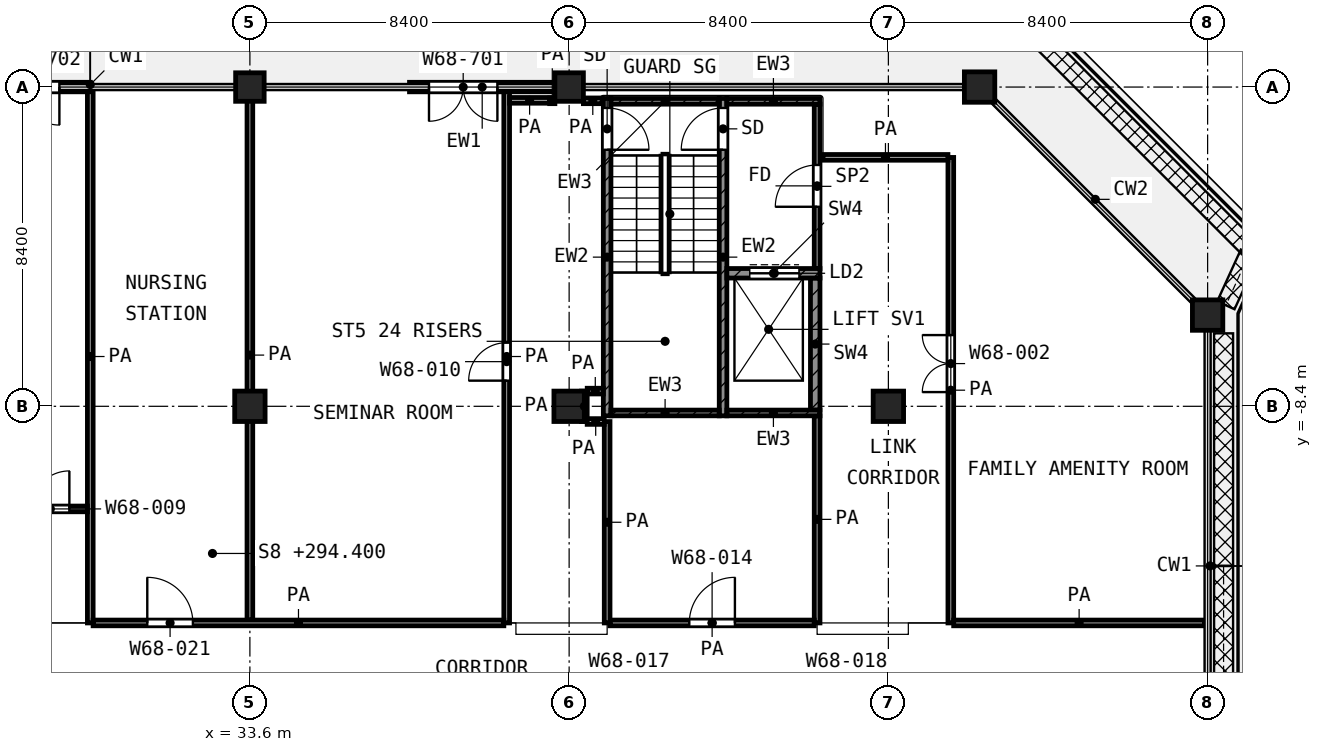
"""IFC4 building model, lengths in metres.
Left out: names, types, materials, properties, quantities, classifications, styles, units other than length and angle.
Written with IfcOpenShell. Run it as: python <this file> out.ifc"""

import sys

from ifc_helpers import new_model, si_unit, direction, frame, frame_2d, origin, origin_2d, place, context, subcontext, project, spatial, rectangle, extrude, element, fill, save


model = new_model("IFC4")
c1 = context("Model", 3, precision=1e-05, world=origin(), true_north=direction((0.0, 1.0)))
c2 = subcontext(c1, "Body", "Model", "MODEL_VIEW")
j1 = project(units=[si_unit("LENGTHUNIT", "METRE"), si_unit("PLANEANGLEUNIT", "RADIAN")], contexts=[c1])
p1 = place(None, origin())
s1 = spatial("IfcSite", under=j1, at=p1, CompositionType="ELEMENT")
p2 = place(p1, origin())
s2 = spatial("IfcBuilding", under=s1, at=p2, CompositionType="ELEMENT")
p3 = place(p2, frame((0.0, 0.0, 294.4)))
s3 = spatial("IfcBuildingStorey", under=s2, at=p3, CompositionType="ELEMENT", Elevation=294.4)
for number, where, z_axis, x_axis in (
    (1, (33.6, 0.0, 0.0), (0.0, 0.0, 1.0), (1.0, 0.0, 0.0)),
    (2, (42.0, 0.0, 0.0), (0.0, 0.0, 1.0), (1.0, 0.0, 0.0)),
):
    element("IfcColumn", number, at=place(p3, frame(where, z_axis=z_axis, x_axis=x_axis)), inside=s3, PredefinedType="COLUMN", context=c2, shape_type="SweptSolid", body=[
        extrude(rectangle(XDim=0.75, YDim=0.75, at=origin_2d()), origin(), (0.0, 0.0, 1.0), 4.2),
    ])
for number, where, z_axis, x_axis in (
    (3, (52.8, 0.0, 0.0), (0.0, 0.0, 1.0), (1.0, 0.0, 0.0)),
    (4, (58.8, -6.0, 0.0), (0.0, 0.0, 1.0), (1.0, 0.0, 0.0)),
    (5, (33.6, -8.4, 0.0), (0.0, 0.0, 1.0), (1.0, 0.0, 0.0)),
    (6, (42.0, -8.4, 0.0), (0.0, 0.0, 1.0), (1.0, 0.0, 0.0)),
    (7, (50.4, -8.4, 0.0), (0.0, 0.0, 1.0), (1.0, 0.0, 0.0)),
):
    element("IfcColumn", number, at=place(p3, frame(where, z_axis=z_axis, x_axis=x_axis)), inside=s3, PredefinedType="COLUMN", context=c2, shape_type="SweptSolid", body=[
        extrude(rectangle(XDim=0.8, YDim=0.8, at=origin_2d()), origin(), (0.0, 0.0, 1.0), 4.2),
    ])
p4 = place(p3, frame((41.625, 0.0, 0.0), z_axis=(0.0, 0.0, 1.0), x_axis=(-1.0, 0.0, 0.0)))
e8 = element("IfcWall", 8, at=p4, inside=s3, PredefinedType="SOLIDWALL", context=c2, shape_type="SweptSolid", body=[
    extrude(rectangle(XDim=3.825, YDim=0.25, at=frame_2d((1.913, 0.0))), origin(), (0.0, 0.0, 1.0), 3.48),
])
p5 = place(p4, frame((1.512, 0.0, 0.0)))
e9 = element("IfcOpeningElement", 9, at=p5, cuts=e8, PredefinedType="OPENING", context=c2, shape_type="SweptSolid", body=[
    extrude(rectangle(XDim=1.8, YDim=2.1, at=frame_2d((0.9, 1.05))), frame((0.0, 0.135, 0.0), z_axis=(0.0, -1.0, 0.0), x_axis=(1.0, 0.0, 0.0)), (0.0, 0.0, 1.0), 0.27),
])
p6 = place(p3, frame((29.4, 0.0, 0.0), z_axis=(0.0, 0.0, 1.0), x_axis=(-1.0, 0.0, 0.0)))
e10 = element("IfcWall", 10, at=p6, inside=s3, PredefinedType="SOLIDWALL", context=c2, shape_type="SweptSolid", body=[
    extrude(rectangle(XDim=3.825, YDim=0.25, at=frame_2d((1.913, 0.0))), origin(), (0.0, 0.0, 1.0), 3.48),
])
p7 = place(p6, frame((0.812, 0.0, 0.0)))
e11 = element("IfcOpeningElement", 11, at=p7, cuts=e10, PredefinedType="OPENING", context=c2, shape_type="SweptSolid", body=[
    extrude(rectangle(XDim=1.0, YDim=2.1, at=frame_2d((0.5, 1.05))), frame((0.0, 0.135, 0.0), z_axis=(0.0, -1.0, 0.0), x_axis=(1.0, 0.0, 0.0)), (0.0, 0.0, 1.0), 0.27),
])
p8 = place(p3, frame((43.0, -8.65, 0.0), z_axis=(0.0, 0.0, 1.0), x_axis=(0.0, 1.0, 0.0)))
e12 = element("IfcWall", 12, at=p8, inside=s3, PredefinedType="SHEAR", context=c2, shape_type="SweptSolid", body=[
    extrude(rectangle(XDim=8.35, YDim=0.2, at=frame_2d((4.175, 0.0))), origin(), (0.0, 0.0, 1.0), 3.6),
])
p9 = place(p8, frame((7.0, 0.0, 0.0)))
e13 = element("IfcOpeningElement", 13, at=p9, cuts=e12, PredefinedType="OPENING", context=c2, shape_type="SweptSolid", body=[
    extrude(rectangle(XDim=1.1, YDim=2.1, at=frame_2d((0.55, 1.05))), frame((0.0, 0.11, 0.0), z_axis=(0.0, -1.0, 0.0), x_axis=(1.0, 0.0, 0.0)), (0.0, 0.0, 1.0), 0.22),
])
p10 = place(p3, frame((46.05, -8.65, 0.0), z_axis=(0.0, 0.0, 1.0), x_axis=(0.0, 1.0, 0.0)))
e14 = element("IfcWall", 14, at=p10, inside=s3, PredefinedType="SHEAR", context=c2, shape_type="SweptSolid", body=[
    extrude(rectangle(XDim=8.35, YDim=0.2, at=frame_2d((4.175, 0.0))), origin(), (0.0, 0.0, 1.0), 3.6),
])
p11 = place(p10, frame((7.0, 0.0, 0.0)))
e15 = element("IfcOpeningElement", 15, at=p11, cuts=e14, PredefinedType="OPENING", context=c2, shape_type="SweptSolid", body=[
    extrude(rectangle(XDim=1.1, YDim=2.1, at=frame_2d((0.55, 1.05))), frame((0.0, 0.11, 0.0), z_axis=(0.0, -1.0, 0.0), x_axis=(1.0, 0.0, 0.0)), (0.0, 0.0, 1.0), 0.22),
])
p12 = place(p3, frame((43.1, -0.375, 0.0), z_axis=(0.0, 0.0, 1.0), x_axis=(1.0, 0.0, 0.0)))
e16 = element("IfcWall", 16, at=p12, inside=s3, PredefinedType="SHEAR", context=c2, shape_type="SweptSolid", body=[
    extrude(rectangle(XDim=2.85, YDim=0.15, at=frame_2d((1.425, 0.0))), origin(), (0.0, 0.0, 1.0), 3.6),
])
p13 = place(p3, frame((46.15, -0.375, 0.0), z_axis=(0.0, 0.0, 1.0), x_axis=(1.0, 0.0, 0.0)))
e17 = element("IfcWall", 17, at=p13, inside=s3, PredefinedType="SHEAR", context=c2, shape_type="SweptSolid", body=[
    extrude(rectangle(XDim=2.45, YDim=0.15, at=frame_2d((1.225, 0.0))), origin(), (0.0, 0.0, 1.0), 3.6),
])
p14 = place(p3, frame((43.1, -8.575, 0.0), z_axis=(0.0, 0.0, 1.0), x_axis=(1.0, 0.0, 0.0)))
e18 = element("IfcWall", 18, at=p14, inside=s3, PredefinedType="SHEAR", context=c2, shape_type="SweptSolid", body=[
    extrude(rectangle(XDim=2.85, YDim=0.15, at=frame_2d((1.425, 0.0))), origin(), (0.0, 0.0, 1.0), 3.6),
])
p15 = place(p3, frame((46.15, -8.575, 0.0), z_axis=(0.0, 0.0, 1.0), x_axis=(1.0, 0.0, 0.0)))
e19 = element("IfcWall", 19, at=p15, inside=s3, PredefinedType="SHEAR", context=c2, shape_type="SweptSolid", body=[
    extrude(rectangle(XDim=2.45, YDim=0.15, at=frame_2d((1.225, 0.0))), origin(), (0.0, 0.0, 1.0), 3.6),
])
p16 = place(p3, frame((46.15, -4.9, 0.0), z_axis=(0.0, 0.0, 1.0), x_axis=(1.0, 0.0, 0.0)))
e20 = element("IfcWall", 20, at=p16, inside=s3, PredefinedType="SHEAR", context=c2, shape_type="SweptSolid", body=[
    extrude(rectangle(XDim=2.45, YDim=0.25, at=frame_2d((1.225, 0.0))), origin(), (0.0, 0.0, 1.0), 3.6),
])
p17 = place(p16, frame((0.6, 0.0, 0.0)))
e21 = element("IfcOpeningElement", 21, at=p17, cuts=e20, PredefinedType="OPENING", context=c2, shape_type="SweptSolid", body=[
    extrude(rectangle(XDim=1.3, YDim=2.1, at=frame_2d((0.65, 1.05))), frame((0.0, 0.135, 0.0), z_axis=(0.0, -1.0, 0.0), x_axis=(1.0, 0.0, 0.0)), (0.0, 0.0, 1.0), 0.27),
])
p18 = place(p3, frame((48.475, -8.5, 0.0), z_axis=(0.0, 0.0, 1.0), x_axis=(0.0, 1.0, 0.0)))
e22 = element("IfcWall", 22, at=p18, inside=s3, PredefinedType="SHEAR", context=c2, shape_type="SweptSolid", body=[
    extrude(rectangle(XDim=3.475, YDim=0.25, at=frame_2d((1.738, 0.0))), origin(), (0.0, 0.0, 1.0), 3.6),
])
p19 = place(p3, frame((48.525, -4.775, 0.0), z_axis=(0.0, 0.0, 1.0), x_axis=(0.0, 1.0, 0.0)))
e23 = element("IfcWall", 23, at=p19, inside=s3, PredefinedType="PARTITIONING", context=c2, shape_type="SweptSolid", body=[
    extrude(rectangle(XDim=4.325, YDim=0.15, at=frame_2d((2.163, 0.0))), origin(), (0.0, 0.0, 1.0), 3.6),
])
p20 = place(p19, frame((1.625, 0.0, 0.0)))
e24 = element("IfcOpeningElement", 24, at=p20, cuts=e23, PredefinedType="OPENING", context=c2, shape_type="SweptSolid", body=[
    extrude(rectangle(XDim=1.1, YDim=2.1, at=frame_2d((0.55, 1.05))), frame((0.0, 0.085, 0.0), z_axis=(0.0, -1.0, 0.0), x_axis=(1.0, 0.0, 0.0)), (0.0, 0.0, 1.0), 0.17),
])
p21 = place(p3, frame((29.475, -14.1, 0.0), z_axis=(0.0, 0.0, 1.0), x_axis=(1.0, 0.0, 0.0)))
e25 = element("IfcWall", 25, at=p21, inside=s3, PredefinedType="PARTITIONING", context=c2, shape_type="SweptSolid", body=[
    extrude(rectangle(XDim=10.807, YDim=0.15, at=frame_2d((5.403, 0.0))), origin(), (0.0, 0.0, 1.0), 3.6),
])
p22 = place(p21, frame((1.425, 0.0, 0.0)))
e26 = element("IfcOpeningElement", 26, at=p22, cuts=e25, PredefinedType="OPENING", context=c2, shape_type="SweptSolid", body=[
    extrude(rectangle(XDim=1.2, YDim=2.1, at=frame_2d((0.6, 1.05))), frame((0.0, 0.085, 0.0), z_axis=(0.0, -1.0, 0.0), x_axis=(1.0, 0.0, 0.0)), (0.0, 0.0, 1.0), 0.17),
])
p23 = place(p3, frame((43.075, -14.1, 0.0), z_axis=(0.0, 0.0, 1.0), x_axis=(1.0, 0.0, 0.0)))
e27 = element("IfcWall", 27, at=p23, inside=s3, PredefinedType="PARTITIONING", context=c2, shape_type="SweptSolid", body=[
    extrude(rectangle(XDim=5.375, YDim=0.15, at=frame_2d((2.688, 0.0))), origin(), (0.0, 0.0, 1.0), 3.6),
])
p24 = place(p23, frame((2.087, 0.0, 0.0)))
e28 = element("IfcOpeningElement", 28, at=p24, cuts=e27, PredefinedType="OPENING", context=c2, shape_type="SweptSolid", body=[
    extrude(rectangle(XDim=1.2, YDim=2.1, at=frame_2d((0.6, 1.05))), frame((0.0, 0.085, 0.0), z_axis=(0.0, -1.0, 0.0), x_axis=(1.0, 0.0, 0.0)), (0.0, 0.0, 1.0), 0.17),
])
p25 = place(p3, frame((52.118, -14.1, 0.0), z_axis=(0.0, 0.0, 1.0), x_axis=(1.0, 0.0, 0.0)))
e29 = element("IfcWall", 29, at=p25, inside=s3, PredefinedType="PARTITIONING", context=c2, shape_type="SweptSolid", body=[
    extrude(rectangle(XDim=6.602, YDim=0.15, at=frame_2d((3.301, 0.0))), origin(), (0.0, 0.0, 1.0), 3.6),
])
p26 = place(p3, frame((24.7, -11.1, 0.0), z_axis=(0.0, 0.0, 1.0), x_axis=(1.0, 0.0, 0.0)))
e30 = element("IfcWall", 30, at=p26, inside=s3, PredefinedType="PARTITIONING", context=c2, shape_type="SweptSolid", body=[
    extrude(rectangle(XDim=4.625, YDim=0.15, at=frame_2d((2.312, 0.0))), origin(), (0.0, 0.0, 1.0), 3.6),
])
p27 = place(p26, frame((1.1, 0.0, 0.0)))
e31 = element("IfcOpeningElement", 31, at=p27, cuts=e30, PredefinedType="OPENING", context=c2, shape_type="SweptSolid", body=[
    extrude(rectangle(XDim=0.9, YDim=2.1, at=frame_2d((0.45, 1.05))), frame((0.0, 0.085, 0.0), z_axis=(0.0, -1.0, 0.0), x_axis=(1.0, 0.0, 0.0)), (0.0, 0.0, 1.0), 0.17),
])
p28 = place(p26, frame((3.15, 0.0, 0.0)))
e32 = element("IfcOpeningElement", 32, at=p28, cuts=e30, PredefinedType="OPENING", context=c2, shape_type="SweptSolid", body=[
    extrude(rectangle(XDim=1.0, YDim=2.1, at=frame_2d((0.5, 1.05))), frame((0.0, 0.085, 0.0), z_axis=(0.0, -1.0, 0.0), x_axis=(1.0, 0.0, 0.0)), (0.0, 0.0, 1.0), 0.17),
])
p29 = place(p3, frame((42.475, -8.8, 0.0), z_axis=(0.0, 0.0, 1.0), x_axis=(1.0, 0.0, 0.0)))
e33 = element("IfcWall", 33, at=p29, inside=s3, PredefinedType="PARTITIONING", context=c2, shape_type="SweptSolid", body=[
    extrude(rectangle(XDim=0.448, YDim=0.15, at=frame_2d((0.224, 0.0))), origin(), (0.0, 0.0, 1.0), 3.6),
])
p30 = place(p3, frame((42.476, -8.0, 0.0), z_axis=(0.0, 0.0, 1.0), x_axis=(1.0, 0.0, 0.0)))
e34 = element("IfcWall", 34, at=p30, inside=s3, PredefinedType="PARTITIONING", context=c2, shape_type="SweptSolid", body=[
    extrude(rectangle(XDim=0.424, YDim=0.15, at=frame_2d((0.212, 0.0))), origin(), (0.0, 0.0, 1.0), 3.6),
])
p31 = place(p3, frame((48.68, -1.85, 0.0), z_axis=(0.0, 0.0, 1.0), x_axis=(1.0, 0.0, 0.0)))
e35 = element("IfcWall", 35, at=p31, inside=s3, PredefinedType="PARTITIONING", context=c2, shape_type="SweptSolid", body=[
    extrude(rectangle(XDim=3.287, YDim=0.15, at=frame_2d((1.644, 0.0))), origin(), (0.0, 0.0, 1.0), 3.6),
])
p32 = place(p3, frame((41.488, -0.362, 0.0), z_axis=(0.0, 0.0, 1.0), x_axis=(1.0, 0.0, 0.0)))
e36 = element("IfcWall", 36, at=p32, inside=s3, PredefinedType="PARTITIONING", context=c2, shape_type="SweptSolid", body=[
    extrude(rectangle(XDim=0.137, YDim=0.15, at=frame_2d((0.068, 0.0))), origin(), (0.0, 0.0, 1.0), 3.6),
])
p33 = place(p3, frame((42.375, -0.362, 0.0), z_axis=(0.0, 0.0, 1.0), x_axis=(1.0, 0.0, 0.0)))
e37 = element("IfcWall", 37, at=p33, inside=s3, PredefinedType="PARTITIONING", context=c2, shape_type="SweptSolid", body=[
    extrude(rectangle(XDim=0.495, YDim=0.15, at=frame_2d((0.248, 0.0))), origin(), (0.0, 0.0, 1.0), 3.6),
])
p34 = place(p3, frame((40.432, -0.35, 0.0), z_axis=(0.0, 0.0, 1.0), x_axis=(1.0, 0.0, 0.0)))
e38 = element("IfcWall", 38, at=p34, inside=s3, PredefinedType="PARTITIONING", context=c2, shape_type="SweptSolid", body=[
    extrude(rectangle(XDim=1.056, YDim=0.15, at=frame_2d((0.528, 0.0))), origin(), (0.0, 0.0, 1.0), 3.6),
])
p35 = place(p3, frame((29.4, -14.1, 0.0), z_axis=(0.0, 0.0, 1.0), x_axis=(0.0, 1.0, 0.0)))
e39 = element("IfcWall", 39, at=p35, inside=s3, PredefinedType="PARTITIONING", context=c2, shape_type="SweptSolid", body=[
    extrude(rectangle(XDim=14.02, YDim=0.15, at=frame_2d((7.01, 0.0))), origin(), (0.0, 0.0, 1.0), 3.6),
])
p36 = place(p3, frame((33.6, -14.025, 0.0), z_axis=(0.0, 0.0, 1.0), x_axis=(0.0, 1.0, 0.0)))
e40 = element("IfcWall", 40, at=p36, inside=s3, PredefinedType="PARTITIONING", context=c2, shape_type="SweptSolid", body=[
    extrude(rectangle(XDim=13.945, YDim=0.15, at=frame_2d((6.972, 0.0))), origin(), (0.0, 0.0, 1.0), 3.6),
])
p37 = place(p3, frame((40.357, -14.1, 0.0), z_axis=(0.0, 0.0, 1.0), x_axis=(0.0, 1.0, 0.0)))
e41 = element("IfcWall", 41, at=p37, inside=s3, PredefinedType="PARTITIONING", context=c2, shape_type="SweptSolid", body=[
    extrude(rectangle(XDim=14.02, YDim=0.15, at=frame_2d((7.01, 0.0))), origin(), (0.0, 0.0, 1.0), 3.6),
])
p38 = place(p37, frame((6.375, 0.0, 0.0)))
e42 = element("IfcOpeningElement", 42, at=p38, cuts=e41, PredefinedType="OPENING", context=c2, shape_type="SweptSolid", body=[
    extrude(rectangle(XDim=1.0, YDim=2.1, at=frame_2d((0.5, 1.05))), frame((0.0, 0.085, 0.0), z_axis=(0.0, -1.0, 0.0), x_axis=(1.0, 0.0, 0.0)), (0.0, 0.0, 1.0), 0.17),
])
p39 = place(p3, frame((42.4, -8.8, 0.0), z_axis=(0.0, 0.0, 1.0), x_axis=(0.0, 1.0, 0.0)))
e43 = element("IfcWall", 43, at=p39, inside=s3, PredefinedType="PARTITIONING", context=c2, shape_type="SweptSolid", body=[
    extrude(rectangle(XDim=0.799, YDim=0.15, at=frame_2d((0.399, 0.0))), origin(), (0.0, 0.0, 1.0), 3.6),
])
p40 = place(p3, frame((43.0, -14.1, 0.0), z_axis=(0.0, 0.0, 1.0), x_axis=(0.0, 1.0, 0.0)))
e44 = element("IfcWall", 44, at=p40, inside=s3, PredefinedType="PARTITIONING", context=c2, shape_type="SweptSolid", body=[
    extrude(rectangle(XDim=5.298, YDim=0.15, at=frame_2d((2.649, 0.0))), origin(), (0.0, 0.0, 1.0), 3.6),
])
p41 = place(p3, frame((48.525, -14.1, 0.0), z_axis=(0.0, 0.0, 1.0), x_axis=(0.0, 1.0, 0.0)))
e45 = element("IfcWall", 45, at=p41, inside=s3, PredefinedType="PARTITIONING", context=c2, shape_type="SweptSolid", body=[
    extrude(rectangle(XDim=5.45, YDim=0.15, at=frame_2d((2.725, 0.0))), origin(), (0.0, 0.0, 1.0), 3.6),
])
p42 = place(p3, frame((52.043, -14.1, 0.0), z_axis=(0.0, 0.0, 1.0), x_axis=(0.0, 1.0, 0.0)))
e46 = element("IfcWall", 46, at=p42, inside=s3, PredefinedType="PARTITIONING", context=c2, shape_type="SweptSolid", body=[
    extrude(rectangle(XDim=12.248, YDim=0.15, at=frame_2d((6.124, 0.0))), origin(), (0.0, 0.0, 1.0), 3.6),
])
p43 = place(p42, frame((6.074, 0.0, 0.0)))
e47 = element("IfcOpeningElement", 47, at=p43, cuts=e46, PredefinedType="OPENING", context=c2, shape_type="SweptSolid", body=[
    extrude(rectangle(XDim=1.5, YDim=2.1, at=frame_2d((0.75, 1.05))), frame((0.0, 0.085, 0.0), z_axis=(0.0, -1.0, 0.0), x_axis=(1.0, 0.0, 0.0)), (0.0, 0.0, 1.0), 0.17),
])
p44 = place(p5, origin())
e48 = element("IfcDoor", 48, at=p44, inside=s3, OperationType="DOUBLE_DOOR_SINGLE_SWING", PredefinedType="DOOR", context=c2, shape_type="SweptSolid", body=[
    extrude(rectangle(XDim=1.8, YDim=2.1, at=frame_2d((0.9, 1.05))), frame((0.0, 0.025, 0.0), z_axis=(0.0, -1.0, 0.0), x_axis=(1.0, 0.0, 0.0)), (0.0, 0.0, 1.0), 0.05),
])
fill(e9, e48)
p45 = place(p7, origin())
e49 = element("IfcDoor", 49, at=p45, inside=s3, OperationType="SINGLE_SWING_LEFT", PredefinedType="DOOR", context=c2, shape_type="SweptSolid", body=[
    extrude(rectangle(XDim=1.0, YDim=2.1, at=frame_2d((0.5, 1.05))), frame((0.0, 0.025, 0.0), z_axis=(0.0, -1.0, 0.0), x_axis=(1.0, 0.0, 0.0)), (0.0, 0.0, 1.0), 0.05),
])
fill(e11, e49)
p46 = place(p9, frame((1.1, 0.0, 0.0), z_axis=(0.0, 0.0, 1.0), x_axis=(-1.0, 0.0, 0.0)))
e50 = element("IfcDoor", 50, at=p46, inside=s3, OperationType="SINGLE_SWING_LEFT", PredefinedType="DOOR", context=c2, shape_type="SweptSolid", body=[
    extrude(rectangle(XDim=1.1, YDim=2.1, at=frame_2d((0.55, 1.05))), frame((0.0, 0.025, 0.0), z_axis=(0.0, -1.0, 0.0), x_axis=(1.0, 0.0, 0.0)), (0.0, 0.0, 1.0), 0.05),
])
fill(e13, e50)
p47 = place(p11, origin())
e51 = element("IfcDoor", 51, at=p47, inside=s3, OperationType="SINGLE_SWING_LEFT", PredefinedType="DOOR", context=c2, shape_type="SweptSolid", body=[
    extrude(rectangle(XDim=1.1, YDim=2.1, at=frame_2d((0.55, 1.05))), frame((0.0, 0.025, 0.0), z_axis=(0.0, -1.0, 0.0), x_axis=(1.0, 0.0, 0.0)), (0.0, 0.0, 1.0), 0.05),
])
fill(e15, e51)
p48 = place(p17, origin())
e52 = element("IfcDoor", 52, at=p48, inside=s3, OperationType="DOUBLE_DOOR_SLIDING", PredefinedType="DOOR", context=c2, shape_type="SweptSolid", body=[
    extrude(rectangle(XDim=1.3, YDim=2.1, at=frame_2d((0.65, 1.05))), frame((0.0, 0.025, 0.0), z_axis=(0.0, -1.0, 0.0), x_axis=(1.0, 0.0, 0.0)), (0.0, 0.0, 1.0), 0.05),
])
fill(e21, e52)
p49 = place(p20, origin())
e53 = element("IfcDoor", 53, at=p49, inside=s3, OperationType="SINGLE_SWING_LEFT", PredefinedType="DOOR", context=c2, shape_type="SweptSolid", body=[
    extrude(rectangle(XDim=1.1, YDim=2.1, at=frame_2d((0.55, 1.05))), frame((0.0, 0.025, 0.0), z_axis=(0.0, -1.0, 0.0), x_axis=(1.0, 0.0, 0.0)), (0.0, 0.0, 1.0), 0.05),
])
fill(e24, e53)
p50 = place(p38, origin())
e54 = element("IfcDoor", 54, at=p50, inside=s3, OperationType="SINGLE_SWING_LEFT", PredefinedType="DOOR", context=c2, shape_type="SweptSolid", body=[
    extrude(rectangle(XDim=1.0, YDim=2.1, at=frame_2d((0.5, 1.05))), frame((0.0, 0.025, 0.0), z_axis=(0.0, -1.0, 0.0), x_axis=(1.0, 0.0, 0.0)), (0.0, 0.0, 1.0), 0.05),
])
fill(e42, e54)
p51 = place(p24, origin())
e55 = element("IfcDoor", 55, at=p51, inside=s3, OperationType="SINGLE_SWING_RIGHT", PredefinedType="DOOR", context=c2, shape_type="SweptSolid", body=[
    extrude(rectangle(XDim=1.2, YDim=2.1, at=frame_2d((0.6, 1.05))), frame((0.0, 0.025, 0.0), z_axis=(0.0, -1.0, 0.0), x_axis=(1.0, 0.0, 0.0)), (0.0, 0.0, 1.0), 0.05),
])
fill(e28, e55)
p52 = place(p43, origin())
e56 = element("IfcDoor", 56, at=p52, inside=s3, OperationType="DOUBLE_DOOR_SINGLE_SWING", PredefinedType="DOOR", context=c2, shape_type="SweptSolid", body=[
    extrude(rectangle(XDim=1.5, YDim=2.1, at=frame_2d((0.75, 1.05))), frame((0.0, 0.025, 0.0), z_axis=(0.0, -1.0, 0.0), x_axis=(1.0, 0.0, 0.0)), (0.0, 0.0, 1.0), 0.05),
])
fill(e47, e56)
p53 = place(p28, origin())
e57 = element("IfcDoor", 57, at=p53, inside=s3, OperationType="SINGLE_SWING_RIGHT", PredefinedType="DOOR", context=c2, shape_type="SweptSolid", body=[
    extrude(rectangle(XDim=1.0, YDim=2.1, at=frame_2d((0.5, 1.05))), frame((0.0, 0.025, 0.0), z_axis=(0.0, -1.0, 0.0), x_axis=(1.0, 0.0, 0.0)), (0.0, 0.0, 1.0), 0.05),
])
fill(e32, e57)
p54 = place(p22, origin())
e58 = element("IfcDoor", 58, at=p54, inside=s3, OperationType="SINGLE_SWING_LEFT", PredefinedType="DOOR", context=c2, shape_type="SweptSolid", body=[
    extrude(rectangle(XDim=1.2, YDim=2.1, at=frame_2d((0.6, 1.05))), frame((0.0, 0.025, 0.0), z_axis=(0.0, -1.0, 0.0), x_axis=(1.0, 0.0, 0.0)), (0.0, 0.0, 1.0), 0.05),
])
fill(e26, e58)
save(model, sys.argv[1])
